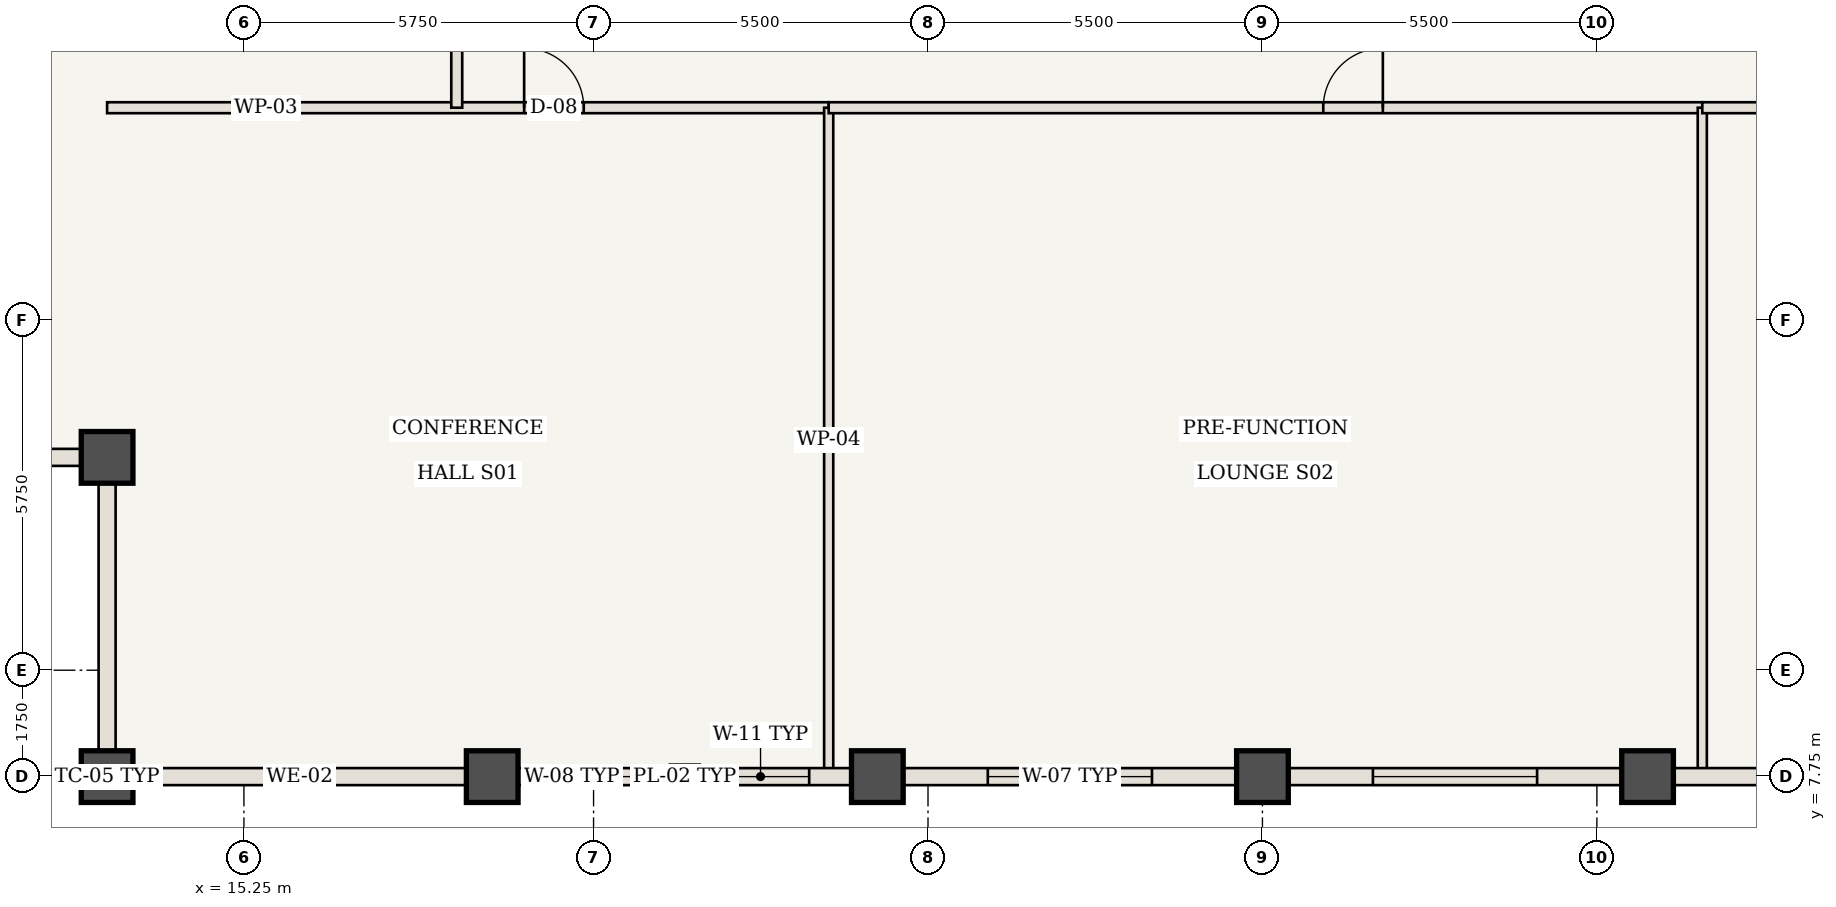
"""IFC4 building model, lengths in metres.
Left out: names, types, materials, properties, quantities, classifications, styles, units other than length and angle.
Written with IfcOpenShell. Run it as: python <this file> out.ifc"""

import sys

from ifc_helpers import new_model, si_unit, direction, frame, frame_2d, origin, origin_2d, place, context, subcontext, project, spatial, rectangle, extrude, element, fill, save


model = new_model("IFC4")
c1 = context("Model", 3, precision=1e-05, world=origin(), true_north=direction((0.0, 1.0)))
c2 = subcontext(c1, "Body", "Model", "MODEL_VIEW")
j1 = project(units=[si_unit("LENGTHUNIT", "METRE"), si_unit("PLANEANGLEUNIT", "RADIAN")], contexts=[c1])
p1 = place(None, origin())
s1 = spatial("IfcSite", under=j1, at=p1, CompositionType="ELEMENT")
p2 = place(p1, origin())
s2 = spatial("IfcBuilding", under=s1, at=p2, CompositionType="ELEMENT")
p3 = place(p2, frame((0.0, 0.0, 233.1)))
s3 = spatial("IfcBuildingStorey", under=s2, at=p3, CompositionType="ELEMENT", Elevation=233.1)
for number, where, z_axis, x_axis in (
    (1, (13.0, 7.75, 0.0), (0.0, 0.0, 1.0), (1.0, 0.0, 0.0)),
    (2, (13.0, 13.0, 0.0), (0.0, 0.0, 1.0), (1.0, 0.0, 0.0)),
    (3, (19.333, 7.75, 0.0), (0.0, 0.0, 1.0), (1.0, 0.0, 0.0)),
    (4, (25.667, 7.75, 0.0), (0.0, 0.0, 1.0), (1.0, 0.0, 0.0)),
    (5, (32.0, 7.75, 0.0), (0.0, 0.0, 1.0), (1.0, 0.0, 0.0)),
    (6, (38.333, 7.75, 0.0), (0.0, 0.0, 1.0), (1.0, 0.0, 0.0)),
):
    element("IfcColumn", number, at=place(p3, frame(where, z_axis=z_axis, x_axis=x_axis)), inside=s3, PredefinedType="COLUMN", context=c2, shape_type="SweptSolid", body=[
        extrude(rectangle(XDim=0.85, YDim=0.85, at=origin_2d()), origin(), (0.0, 0.0, 1.0), 3.85),
    ])
p4 = place(p3, frame((13.0, 18.75, 0.0), z_axis=(0.0, 0.0, 1.0), x_axis=(1.0, 0.0, 0.0)))
e7 = element("IfcWall", 7, at=p4, inside=s3, PredefinedType="STANDARD", context=c2, shape_type="SweptSolid", body=[
    extrude(rectangle(XDim=11.867, YDim=0.18, at=frame_2d((5.933, 0.0))), origin(), (0.0, 0.0, 1.0), 3.685),
])
p5 = place(p4, frame((6.858, 0.0, 0.0)))
e8 = element("IfcOpeningElement", 8, at=p5, cuts=e7, PredefinedType="OPENING", context=c2, shape_type="SweptSolid", body=[
    extrude(rectangle(XDim=0.98, YDim=2.2, at=frame_2d((0.49, 1.1))), frame((0.0, 0.1, 0.0), z_axis=(0.0, -1.0, 0.0), x_axis=(1.0, 0.0, 0.0)), (0.0, 0.0, 1.0), 0.2),
])
p6 = place(p3, frame((24.867, 7.81, 0.0), z_axis=(0.0, 0.0, 1.0), x_axis=(0.0, 1.0, 0.0)))
e9 = element("IfcWall", 9, at=p6, inside=s3, PredefinedType="STANDARD", context=c2, shape_type="SweptSolid", body=[
    extrude(rectangle(XDim=10.94, YDim=0.15, at=frame_2d((5.47, 0.0))), origin(), (0.0, 0.0, 1.0), 3.685),
])
p7 = place(p3, frame((24.867, 18.75, 0.0), z_axis=(0.0, 0.0, 1.0), x_axis=(1.0, 0.0, 0.0)))
e10 = element("IfcWall", 10, at=p7, inside=s3, PredefinedType="STANDARD", context=c2, shape_type="SweptSolid", body=[
    extrude(rectangle(XDim=14.367, YDim=0.18, at=frame_2d((7.183, 0.0))), origin(), (0.0, 0.0, 1.0), 3.685),
])
p8 = place(p7, frame((8.133, 0.0, 0.0)))
e11 = element("IfcOpeningElement", 11, at=p8, cuts=e10, PredefinedType="OPENING", context=c2, shape_type="SweptSolid", body=[
    extrude(rectangle(XDim=0.98, YDim=2.2, at=frame_2d((0.49, 1.1))), frame((0.0, 0.1, 0.0), z_axis=(0.0, -1.0, 0.0), x_axis=(1.0, 0.0, 0.0)), (0.0, 0.0, 1.0), 0.2),
])
p9 = place(p3, frame((39.233, 7.81, 0.0), z_axis=(0.0, 0.0, 1.0), x_axis=(0.0, 1.0, 0.0)))
e12 = element("IfcWall", 12, at=p9, inside=s3, PredefinedType="STANDARD", context=c2, shape_type="SweptSolid", body=[
    extrude(rectangle(XDim=10.94, YDim=0.15, at=frame_2d((5.47, 0.0))), origin(), (0.0, 0.0, 1.0), 3.685),
])
p10 = place(p3, frame((39.233, 18.75, 0.0), z_axis=(0.0, 0.0, 1.0), x_axis=(1.0, 0.0, 0.0)))
e13 = element("IfcWall", 13, at=p10, inside=s3, PredefinedType="STANDARD", context=c2, shape_type="SweptSolid", body=[
    extrude(rectangle(XDim=11.767, YDim=0.18, at=frame_2d((5.883, 0.0))), origin(), (0.0, 0.0, 1.0), 3.685),
])
p11 = place(p10, frame((1.208, 0.0, 0.0)))
e14 = element("IfcOpeningElement", 14, at=p11, cuts=e13, PredefinedType="OPENING", context=c2, shape_type="SweptSolid", body=[
    extrude(rectangle(XDim=0.98, YDim=2.2, at=frame_2d((0.49, 1.1))), frame((0.0, 0.1, 0.0), z_axis=(0.0, -1.0, 0.0), x_axis=(1.0, 0.0, 0.0)), (0.0, 0.0, 1.0), 0.2),
])
p12 = place(p3, frame((18.75, 18.75, 0.0), z_axis=(0.0, 0.0, 1.0), x_axis=(0.0, 1.0, 0.0)))
e15 = element("IfcWall", 15, at=p12, inside=s3, PredefinedType="STANDARD", context=c2, shape_type="SweptSolid", body=[
    extrude(rectangle(XDim=26.5, YDim=0.18, at=frame_2d((13.25, 0.0))), origin(), (0.0, 0.0, 1.0), 3.685),
])
p13 = place(p12, frame((14.2, 0.0, 0.0)))
e16 = element("IfcOpeningElement", 16, at=p13, cuts=e15, PredefinedType="OPENING", context=c2, shape_type="SweptSolid", body=[
    extrude(rectangle(XDim=0.98, YDim=2.2, at=frame_2d((0.49, 1.1))), frame((0.0, 0.1, 0.0), z_axis=(0.0, -1.0, 0.0), x_axis=(1.0, 0.0, 0.0)), (0.0, 0.0, 1.0), 0.2),
])
p14 = place(p3, frame((19.333, 7.75, 0.0), z_axis=(0.0, 0.0, 1.0), x_axis=(-1.0, 0.0, 0.0)))
e17 = element("IfcWall", 17, at=p14, inside=s3, PredefinedType="USERDEFINED", context=c2, shape_type="SweptSolid", body=[
    extrude(rectangle(XDim=6.333, YDim=0.28, at=frame_2d((3.167, 0.0))), origin(), (0.0, 0.0, 1.0), 2.985),
])
p15 = place(p3, frame((25.667, 7.75, 0.0), z_axis=(0.0, 0.0, 1.0), x_axis=(-1.0, 0.0, 0.0)))
e18 = element("IfcWall", 18, at=p15, inside=s3, PredefinedType="USERDEFINED", context=c2, shape_type="SweptSolid", body=[
    extrude(rectangle(XDim=6.333, YDim=0.28, at=frame_2d((3.167, 0.0))), origin(), (0.0, 0.0, 1.0), 2.985),
])
p16 = place(p15, frame((1.121, 0.0, 0.85)))
e19 = element("IfcOpeningElement", 19, at=p16, cuts=e18, PredefinedType="OPENING", context=c2, shape_type="SweptSolid", body=[
    extrude(rectangle(XDim=1.6, YDim=1.935, at=frame_2d((0.8, 0.968))), frame((0.0, 0.15, 0.0), z_axis=(0.0, -1.0, 0.0), x_axis=(1.0, 0.0, 0.0)), (0.0, 0.0, 1.0), 0.3),
])
p17 = place(p15, frame((3.675, 0.0, 0.85)))
e20 = element("IfcOpeningElement", 20, at=p17, cuts=e18, PredefinedType="OPENING", context=c2, shape_type="SweptSolid", body=[
    extrude(rectangle(XDim=1.95, YDim=1.935, at=frame_2d((0.975, 0.968))), frame((0.0, 0.15, 0.0), z_axis=(0.0, -1.0, 0.0), x_axis=(1.0, 0.0, 0.0)), (0.0, 0.0, 1.0), 0.3),
])
p18 = place(p3, frame((32.0, 7.75, 0.0), z_axis=(0.0, 0.0, 1.0), x_axis=(-1.0, 0.0, 0.0)))
e21 = element("IfcWall", 21, at=p18, inside=s3, PredefinedType="USERDEFINED", context=c2, shape_type="SweptSolid", body=[
    extrude(rectangle(XDim=6.333, YDim=0.28, at=frame_2d((3.167, 0.0))), origin(), (0.0, 0.0, 1.0), 2.985),
])
p19 = place(p18, frame((1.817, 0.0, 0.85)))
e22 = element("IfcOpeningElement", 22, at=p19, cuts=e21, PredefinedType="OPENING", context=c2, shape_type="SweptSolid", body=[
    extrude(rectangle(XDim=2.7, YDim=1.935, at=frame_2d((1.35, 0.968))), frame((0.0, 0.15, 0.0), z_axis=(0.0, -1.0, 0.0), x_axis=(1.0, 0.0, 0.0)), (0.0, 0.0, 1.0), 0.3),
])
p20 = place(p3, frame((38.333, 7.75, 0.0), z_axis=(0.0, 0.0, 1.0), x_axis=(-1.0, 0.0, 0.0)))
e23 = element("IfcWall", 23, at=p20, inside=s3, PredefinedType="USERDEFINED", context=c2, shape_type="SweptSolid", body=[
    extrude(rectangle(XDim=6.333, YDim=0.28, at=frame_2d((3.167, 0.0))), origin(), (0.0, 0.0, 1.0), 2.985),
])
p21 = place(p20, frame((1.817, 0.0, 0.85)))
e24 = element("IfcOpeningElement", 24, at=p21, cuts=e23, PredefinedType="OPENING", context=c2, shape_type="SweptSolid", body=[
    extrude(rectangle(XDim=2.7, YDim=1.935, at=frame_2d((1.35, 0.968))), frame((0.0, 0.15, 0.0), z_axis=(0.0, -1.0, 0.0), x_axis=(1.0, 0.0, 0.0)), (0.0, 0.0, 1.0), 0.3),
])
p22 = place(p3, frame((44.667, 7.75, 0.0), z_axis=(0.0, 0.0, 1.0), x_axis=(-1.0, 0.0, 0.0)))
e25 = element("IfcWall", 25, at=p22, inside=s3, PredefinedType="USERDEFINED", context=c2, shape_type="SweptSolid", body=[
    extrude(rectangle(XDim=6.333, YDim=0.28, at=frame_2d((3.167, 0.0))), origin(), (0.0, 0.0, 1.0), 2.985),
])
p23 = place(p22, frame((0.708, 0.0, 0.85)))
e26 = element("IfcOpeningElement", 26, at=p23, cuts=e25, PredefinedType="OPENING", context=c2, shape_type="SweptSolid", body=[
    extrude(rectangle(XDim=1.95, YDim=1.935, at=frame_2d((0.975, 0.968))), frame((0.0, 0.15, 0.0), z_axis=(0.0, -1.0, 0.0), x_axis=(1.0, 0.0, 0.0)), (0.0, 0.0, 1.0), 0.3),
])
for number, where, z_axis, x_axis in (
    (27, (13.0, 7.75, 0.0), (0.0, 0.0, 1.0), (0.0, 1.0, 0.0)),
    (28, (13.0, 13.0, 0.0), (0.0, 0.0, 1.0), (-1.0, 0.0, 0.0)),
):
    element("IfcWall", number, at=place(p3, frame(where, z_axis=z_axis, x_axis=x_axis)), inside=s3, PredefinedType="USERDEFINED", context=c2, shape_type="SweptSolid", body=[
        extrude(rectangle(XDim=5.25, YDim=0.28, at=frame_2d((2.625, 0.0))), origin(), (0.0, 0.0, 1.0), 2.985),
    ])
p24 = place(p5, origin())
e29 = element("IfcDoor", 29, at=p24, inside=s3, OperationType="SINGLE_SWING_LEFT", PredefinedType="DOOR", context=c2, shape_type="SweptSolid", body=[
    extrude(rectangle(XDim=0.98, YDim=2.2, at=frame_2d((0.49, 1.1))), frame((0.0, 0.025, 0.0), z_axis=(0.0, -1.0, 0.0), x_axis=(1.0, 0.0, 0.0)), (0.0, 0.0, 1.0), 0.05),
])
fill(e8, e29)
p25 = place(p8, origin())
e30 = element("IfcDoor", 30, at=p25, inside=s3, OperationType="SINGLE_SWING_RIGHT", PredefinedType="DOOR", context=c2, shape_type="SweptSolid", body=[
    extrude(rectangle(XDim=0.98, YDim=2.2, at=frame_2d((0.49, 1.1))), frame((0.0, 0.025, 0.0), z_axis=(0.0, -1.0, 0.0), x_axis=(1.0, 0.0, 0.0)), (0.0, 0.0, 1.0), 0.05),
])
fill(e11, e30)
p26 = place(p16, origin())
e31 = element("IfcWindow", 31, at=p26, inside=s3, PartitioningType="SINGLE_PANEL", PredefinedType="WINDOW", context=c2, shape_type="SweptSolid", body=[
    extrude(rectangle(XDim=1.6, YDim=1.935, at=frame_2d((0.8, 0.968))), frame((0.0, 0.03, 0.0), z_axis=(0.0, -1.0, 0.0), x_axis=(1.0, 0.0, 0.0)), (0.0, 0.0, 1.0), 0.06),
])
fill(e19, e31)
p27 = place(p17, origin())
e32 = element("IfcWindow", 32, at=p27, inside=s3, PartitioningType="SINGLE_PANEL", PredefinedType="WINDOW", context=c2, shape_type="SweptSolid", body=[
    extrude(rectangle(XDim=1.95, YDim=1.935, at=frame_2d((0.975, 0.968))), frame((0.0, 0.03, 0.0), z_axis=(0.0, -1.0, 0.0), x_axis=(1.0, 0.0, 0.0)), (0.0, 0.0, 1.0), 0.06),
])
fill(e20, e32)
p28 = place(p19, origin())
e33 = element("IfcWindow", 33, at=p28, inside=s3, PartitioningType="SINGLE_PANEL", PredefinedType="WINDOW", context=c2, shape_type="SweptSolid", body=[
    extrude(rectangle(XDim=2.7, YDim=1.935, at=frame_2d((1.35, 0.968))), frame((0.0, 0.03, 0.0), z_axis=(0.0, -1.0, 0.0), x_axis=(1.0, 0.0, 0.0)), (0.0, 0.0, 1.0), 0.06),
])
fill(e22, e33)
p29 = place(p21, origin())
e34 = element("IfcWindow", 34, at=p29, inside=s3, PartitioningType="SINGLE_PANEL", PredefinedType="WINDOW", context=c2, shape_type="SweptSolid", body=[
    extrude(rectangle(XDim=2.7, YDim=1.935, at=frame_2d((1.35, 0.968))), frame((0.0, 0.03, 0.0), z_axis=(0.0, -1.0, 0.0), x_axis=(1.0, 0.0, 0.0)), (0.0, 0.0, 1.0), 0.06),
])
fill(e24, e34)
save(model, sys.argv[1])
